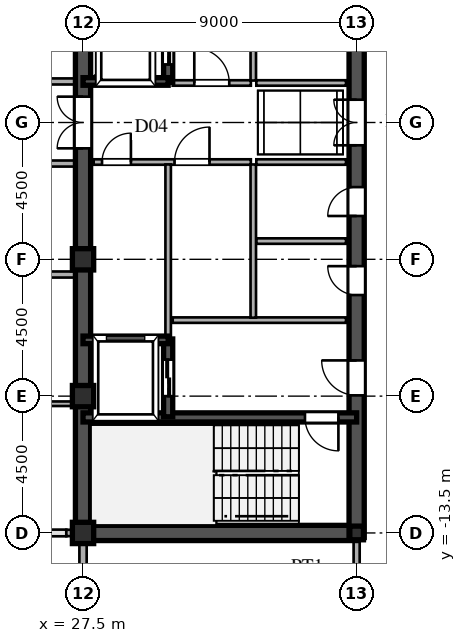
"""IFC4 building model, lengths in metres.
Left out: names, types, materials, properties, quantities, classifications, styles, units other than length and angle.
Written with IfcOpenShell. Run it as: python <this file> out.ifc"""

import sys

from ifc_helpers import new_model, si_unit, direction, frame, frame_2d, origin, origin_2d, place, context, subcontext, project, spatial, rectangle, hollow_rectangle, i_section, extrude, source, transform, mapped, element, fill, save


model = new_model("IFC4")
c1 = context("Model", 3, precision=1e-05, world=origin(), true_north=direction((0.0, 1.0)))
c2 = subcontext(c1, "Body", "Model", "MODEL_VIEW")
j1 = project(units=[si_unit("LENGTHUNIT", "METRE"), si_unit("PLANEANGLEUNIT", "RADIAN")], contexts=[c1])
p1 = place(None, origin())
s1 = spatial("IfcSite", under=j1, at=p1, CompositionType="ELEMENT")
p2 = place(p1, origin())
s2 = spatial("IfcBuilding", under=s1, at=p2, CompositionType="ELEMENT")
p3 = place(p2, frame((0.0, 0.0, 243.15)))
s3 = spatial("IfcBuildingStorey", under=s2, at=p3, CompositionType="ELEMENT", Elevation=243.15)
m1 = source(origin(), c2, "Body", "SweptSolid", [
    extrude(hollow_rectangle(XDim=0.7, YDim=0.7, WallThickness=0.03, at=origin_2d()), origin(), (0.0, 0.0, 1.0), 3.75),
])
for number, where, z_axis, x_axis in (
    (1, (27.5, -13.5, 0.0), (0.0, 0.0, 1.0), (1.0, 0.0, 0.0)),
    (2, (27.5, -9.0, 0.0), (0.0, 0.0, 1.0), (1.0, 0.0, 0.0)),
    (3, (27.5, -4.5, 0.0), (0.0, 0.0, 1.0), (1.0, 0.0, 0.0)),
):
    element("IfcColumn", number, at=place(p3, frame(where, z_axis=z_axis, x_axis=x_axis)), inside=s3, PredefinedType="COLUMN", context=c2, shape_type="MappedRepresentation", body=[
        mapped(m1, transform((0.0, 0.0, 0.0), scale=1.0)),
    ])
m2 = source(origin(), c2, "Body", "SweptSolid", [
    extrude(i_section(OverallWidth=0.45, OverallDepth=0.45, WebThickness=0.016, FlangeThickness=0.025, at=origin_2d()), origin(), (0.0, 0.0, 1.0), 3.75),
])
p4 = place(p3, frame((36.5, -13.5, 0.0), z_axis=(0.0, 0.0, 1.0), x_axis=(1.0, 0.0, 0.0)))
e4 = element("IfcColumn", 4, at=p4, inside=s3, PredefinedType="COLUMN", context=c2, shape_type="MappedRepresentation", body=[
    mapped(m2, transform((0.0, 0.0, 0.0), scale=1.0)),
])
p5 = place(p3, frame((27.5, -15.98, 0.0), z_axis=(0.0, 0.0, 1.0), x_axis=(0.0, 1.0, 0.0)))
e5 = element("IfcWall", 5, at=p5, inside=s3, PredefinedType="SOLIDWALL", context=c2, shape_type="SweptSolid", body=[
    extrude(rectangle(XDim=1.605, YDim=0.24, at=frame_2d((0.803, 0.0))), origin(), (0.0, 0.0, 1.0), 3.53),
])
p6 = place(p3, frame((27.5, -14.375, 0.0), z_axis=(0.0, 0.0, 1.0), x_axis=(0.0, 1.0, 0.0)))
e6 = element("IfcWall", 6, at=p6, inside=s3, PredefinedType="SOLIDWALL", context=c2, shape_type="SweptSolid", body=[
    extrude(rectangle(XDim=0.62, YDim=0.24, at=frame_2d((0.31, 0.0))), origin(), (0.0, 0.0, 1.0), 3.03),
])
p7 = place(p3, frame((26.95, -13.5, 0.0), z_axis=(0.0, 0.0, 1.0), x_axis=(1.0, 0.0, 0.0)))
e7 = element("IfcWall", 7, at=p7, inside=s3, PredefinedType="SOLIDWALL", context=c2, shape_type="SweptSolid", body=[
    extrude(rectangle(XDim=0.54, YDim=0.21, at=frame_2d((0.27, 0.0))), origin(), (0.0, 0.0, 1.0), 3.03),
])
for number, where, z_axis, x_axis in (
    (8, (27.5, -13.5, 0.0), (0.0, 0.0, 1.0), (0.0, 1.0, 0.0)),
    (9, (27.5, 1.3, 0.0), (0.0, 0.0, 1.0), (0.0, 1.0, 0.0)),
):
    element("IfcWall", number, at=place(p3, frame(where, z_axis=z_axis, x_axis=x_axis)), inside=s3, PredefinedType="SHEAR", context=c2, shape_type="SweptSolid", body=[
        extrude(rectangle(XDim=12.2, YDim=0.5, at=frame_2d((6.1, 0.0))), origin(), (0.0, 0.0, 1.0), 3.53),
    ])
p8 = place(p3, frame((27.5, -1.3, 0.0), z_axis=(0.0, 0.0, 1.0), x_axis=(0.0, 1.0, 0.0)))
e10 = element("IfcWall", 10, at=p8, inside=s3, PredefinedType="SHEAR", context=c2, shape_type="SweptSolid", body=[
    extrude(rectangle(XDim=2.6, YDim=0.5, at=frame_2d((1.3, 0.0))), origin(), (0.0, 0.0, 1.0), 3.53),
])
p9 = place(p8, frame((0.45, 0.0, 0.0)))
e11 = element("IfcOpeningElement", 11, at=p9, cuts=e10, PredefinedType="OPENING", context=c2, shape_type="SweptSolid", body=[
    extrude(rectangle(XDim=1.7, YDim=2.35, at=frame_2d((0.85, 1.175))), frame((0.0, 0.26, 0.0), z_axis=(0.0, -1.0, 0.0), x_axis=(1.0, 0.0, 0.0)), (0.0, 0.0, 1.0), 0.52),
])
p10 = place(p3, frame((27.5, -13.5, 0.0), z_axis=(0.0, 0.0, 1.0), x_axis=(1.0, 0.0, 0.0)))
e12 = element("IfcWall", 12, at=p10, inside=s3, PredefinedType="SHEAR", context=c2, shape_type="SweptSolid", body=[
    extrude(rectangle(XDim=9.0, YDim=0.5, at=frame_2d((4.5, 0.0))), origin(), (0.0, 0.0, 1.0), 3.53),
])
p11 = place(p3, frame((36.5, -13.65, 0.0), z_axis=(0.0, 0.0, 1.0), x_axis=(0.0, 1.0, 0.0)))
e13 = element("IfcWall", 13, at=p11, inside=s3, PredefinedType="SHEAR", context=c2, shape_type="SweptSolid", body=[
    extrude(rectangle(XDim=7.15, YDim=0.5, at=frame_2d((3.575, 0.0))), origin(), (0.0, 0.0, 1.0), 3.53),
])
p12 = place(p11, frame((4.675, 0.0, 0.0)))
e14 = element("IfcOpeningElement", 14, at=p12, cuts=e13, PredefinedType="OPENING", context=c2, shape_type="SweptSolid", body=[
    extrude(rectangle(XDim=1.15, YDim=2.2, at=frame_2d((0.575, 1.1))), frame((0.0, 0.26, 0.0), z_axis=(0.0, -1.0, 0.0), x_axis=(1.0, 0.0, 0.0)), (0.0, 0.0, 1.0), 0.52),
])
p13 = place(p3, frame((36.5, -1.3, 0.0), z_axis=(0.0, 0.0, 1.0), x_axis=(0.0, 1.0, 0.0)))
e15 = element("IfcWall", 15, at=p13, inside=s3, PredefinedType="SHEAR", context=c2, shape_type="SweptSolid", body=[
    extrude(rectangle(XDim=2.6, YDim=0.5, at=frame_2d((1.3, 0.0))), origin(), (0.0, 0.0, 1.0), 3.53),
])
p14 = place(p13, frame((0.55, 0.0, 0.0)))
e16 = element("IfcOpeningElement", 16, at=p14, cuts=e15, PredefinedType="OPENING", context=c2, shape_type="SweptSolid", body=[
    extrude(rectangle(XDim=1.5, YDim=2.3, at=frame_2d((0.75, 1.15))), frame((0.0, 0.26, 0.0), z_axis=(0.0, -1.0, 0.0), x_axis=(1.0, 0.0, 0.0)), (0.0, 0.0, 1.0), 0.52),
])
p15 = place(p3, frame((36.5, -6.5, 0.0), z_axis=(0.0, 0.0, 1.0), x_axis=(0.0, 1.0, 0.0)))
e17 = element("IfcWall", 17, at=p15, inside=s3, PredefinedType="SHEAR", context=c2, shape_type="SweptSolid", body=[
    extrude(rectangle(XDim=2.6, YDim=0.5, at=frame_2d((1.3, 0.0))), origin(), (0.0, 0.0, 1.0), 3.53),
])
p16 = place(p15, frame((0.825, 0.0, 0.0)))
e18 = element("IfcOpeningElement", 18, at=p16, cuts=e17, PredefinedType="OPENING", context=c2, shape_type="SweptSolid", body=[
    extrude(rectangle(XDim=0.95, YDim=2.15, at=frame_2d((0.475, 1.075))), frame((0.0, 0.26, 0.0), z_axis=(0.0, -1.0, 0.0), x_axis=(1.0, 0.0, 0.0)), (0.0, 0.0, 1.0), 0.52),
])
p17 = place(p3, frame((36.5, -3.9, 0.0), z_axis=(0.0, 0.0, 1.0), x_axis=(0.0, 1.0, 0.0)))
e19 = element("IfcWall", 19, at=p17, inside=s3, PredefinedType="SHEAR", context=c2, shape_type="SweptSolid", body=[
    extrude(rectangle(XDim=2.6, YDim=0.5, at=frame_2d((1.3, 0.0))), origin(), (0.0, 0.0, 1.0), 3.53),
])
p18 = place(p17, frame((0.825, 0.0, 0.0)))
e20 = element("IfcOpeningElement", 20, at=p18, cuts=e19, PredefinedType="OPENING", context=c2, shape_type="SweptSolid", body=[
    extrude(rectangle(XDim=0.95, YDim=2.15, at=frame_2d((0.475, 1.075))), frame((0.0, 0.26, 0.0), z_axis=(0.0, -1.0, 0.0), x_axis=(1.0, 0.0, 0.0)), (0.0, 0.0, 1.0), 0.52),
])
p19 = place(p3, frame((36.5, 1.3, 0.0), z_axis=(0.0, 0.0, 1.0), x_axis=(0.0, 1.0, 0.0)))
e21 = element("IfcWall", 21, at=p19, inside=s3, PredefinedType="SHEAR", context=c2, shape_type="SweptSolid", body=[
    extrude(rectangle(XDim=3.45, YDim=0.5, at=frame_2d((1.725, 0.0))), origin(), (0.0, 0.0, 1.0), 3.53),
])
p20 = place(p19, frame((1.25, 0.0, 0.0)))
e22 = element("IfcOpeningElement", 22, at=p20, cuts=e21, PredefinedType="OPENING", context=c2, shape_type="SweptSolid", body=[
    extrude(rectangle(XDim=0.95, YDim=2.15, at=frame_2d((0.475, 1.075))), frame((0.0, 0.26, 0.0), z_axis=(0.0, -1.0, 0.0), x_axis=(1.0, 0.0, 0.0)), (0.0, 0.0, 1.0), 0.52),
])
p21 = place(p3, frame((27.5, -9.7, 0.0), z_axis=(0.0, 0.0, 1.0), x_axis=(1.0, 0.0, 0.0)))
e23 = element("IfcWall", 23, at=p21, inside=s3, PredefinedType="SHEAR", context=c2, shape_type="SweptSolid", body=[
    extrude(rectangle(XDim=9.0, YDim=0.3, at=frame_2d((4.5, 0.0))), origin(), (0.0, 0.0, 1.0), 3.53),
])
p22 = place(p21, frame((7.3, 0.0, 0.0)))
e24 = element("IfcOpeningElement", 24, at=p22, cuts=e23, PredefinedType="OPENING", context=c2, shape_type="SweptSolid", body=[
    extrude(rectangle(XDim=1.1, YDim=2.2, at=frame_2d((0.55, 1.1))), frame((0.0, 0.16, 0.0), z_axis=(0.0, -1.0, 0.0), x_axis=(1.0, 0.0, 0.0)), (0.0, 0.0, 1.0), 0.32),
])
for number, where, z_axis, x_axis in (
    (25, (27.5, -7.15, 0.0), (0.0, 0.0, 1.0), (1.0, 0.0, 0.0)),
    (26, (27.5, 1.35, 0.0), (0.0, 0.0, 1.0), (1.0, 0.0, 0.0)),
):
    element("IfcWall", number, at=place(p3, frame(where, z_axis=z_axis, x_axis=x_axis)), inside=s3, PredefinedType="SHEAR", context=c2, shape_type="SweptSolid", body=[
        extrude(rectangle(XDim=2.8, YDim=0.25, at=frame_2d((1.4, 0.0))), origin(), (0.0, 0.0, 1.0), 3.53),
    ])
p23 = place(p3, frame((30.3, -9.68, 0.0), z_axis=(0.0, 0.0, 1.0), x_axis=(0.0, 1.0, 0.0)))
e27 = element("IfcWall", 27, at=p23, inside=s3, PredefinedType="SHEAR", context=c2, shape_type="SweptSolid", body=[
    extrude(rectangle(XDim=2.56, YDim=0.3, at=frame_2d((1.28, 0.0))), origin(), (0.0, 0.0, 1.0), 3.53),
])
p24 = place(p23, frame((0.68, 0.0, 0.0)))
e28 = element("IfcOpeningElement", 28, at=p24, cuts=e27, PredefinedType="OPENING", context=c2, shape_type="SweptSolid", body=[
    extrude(rectangle(XDim=1.2, YDim=2.25, at=frame_2d((0.6, 1.125))), frame((0.0, 0.16, 0.0), z_axis=(0.0, -1.0, 0.0), x_axis=(1.0, 0.0, 0.0)), (0.0, 0.0, 1.0), 0.32),
])
p25 = place(p3, frame((30.3, 1.32, 0.0), z_axis=(0.0, 0.0, 1.0), x_axis=(0.0, 1.0, 0.0)))
e29 = element("IfcWall", 29, at=p25, inside=s3, PredefinedType="SHEAR", context=c2, shape_type="SweptSolid", body=[
    extrude(rectangle(XDim=2.28, YDim=0.3, at=frame_2d((1.14, 0.0))), origin(), (0.0, 0.0, 1.0), 3.53),
])
p26 = place(p25, frame((0.59, 0.0, 0.0)))
e30 = element("IfcOpeningElement", 30, at=p26, cuts=e29, PredefinedType="OPENING", context=c2, shape_type="SweptSolid", body=[
    extrude(rectangle(XDim=1.1, YDim=2.2, at=frame_2d((0.55, 1.1))), frame((0.0, 0.16, 0.0), z_axis=(0.0, -1.0, 0.0), x_axis=(1.0, 0.0, 0.0)), (0.0, 0.0, 1.0), 0.32),
])
p27 = place(p3, frame((30.45, -6.5, 0.0), z_axis=(0.0, 0.0, 1.0), x_axis=(1.0, 0.0, 0.0)))
e31 = element("IfcWall", 31, at=p27, inside=s3, PredefinedType="PARTITIONING", context=c2, shape_type="SweptSolid", body=[
    extrude(rectangle(XDim=5.7, YDim=0.18, at=frame_2d((2.85, 0.0))), origin(), (0.0, 0.0, 1.0), 3.53),
])
p28 = place(p3, frame((33.1, -6.42, 0.0), z_axis=(0.0, 0.0, 1.0), x_axis=(0.0, 1.0, 0.0)))
e32 = element("IfcWall", 32, at=p28, inside=s3, PredefinedType="PARTITIONING", context=c2, shape_type="SweptSolid", body=[
    extrude(rectangle(XDim=5.04, YDim=0.18, at=frame_2d((2.52, 0.0))), origin(), (0.0, 0.0, 1.0), 3.53),
])
p29 = place(p3, frame((33.1, 1.38, 0.0), z_axis=(0.0, 0.0, 1.0), x_axis=(0.0, 1.0, 0.0)))
e33 = element("IfcWall", 33, at=p29, inside=s3, PredefinedType="PARTITIONING", context=c2, shape_type="SweptSolid", body=[
    extrude(rectangle(XDim=6.74, YDim=0.18, at=frame_2d((3.37, 0.0))), origin(), (0.0, 0.0, 1.0), 3.53),
])
p30 = place(p3, frame((27.85, -1.3, 0.0), z_axis=(0.0, 0.0, 1.0), x_axis=(1.0, 0.0, 0.0)))
e34 = element("IfcWall", 34, at=p30, inside=s3, PredefinedType="PARTITIONING", context=c2, shape_type="SweptSolid", body=[
    extrude(rectangle(XDim=2.45, YDim=0.18, at=frame_2d((1.225, 0.0))), origin(), (0.0, 0.0, 1.0), 3.53),
])
p31 = place(p30, frame((0.275, 0.0, 0.0)))
e35 = element("IfcOpeningElement", 35, at=p31, cuts=e34, PredefinedType="OPENING", context=c2, shape_type="SweptSolid", body=[
    extrude(rectangle(XDim=0.95, YDim=2.15, at=frame_2d((0.475, 1.075))), frame((0.0, 0.1, 0.0), z_axis=(0.0, -1.0, 0.0), x_axis=(1.0, 0.0, 0.0)), (0.0, 0.0, 1.0), 0.2),
])
p32 = place(p3, frame((30.3, -1.3, 0.0), z_axis=(0.0, 0.0, 1.0), x_axis=(1.0, 0.0, 0.0)))
e36 = element("IfcWall", 36, at=p32, inside=s3, PredefinedType="PARTITIONING", context=c2, shape_type="SweptSolid", body=[
    extrude(rectangle(XDim=2.72, YDim=0.18, at=frame_2d((1.36, 0.0))), origin(), (0.0, 0.0, 1.0), 3.53),
])
p33 = place(p32, frame((0.21, 0.0, 0.0)))
e37 = element("IfcOpeningElement", 37, at=p33, cuts=e36, PredefinedType="OPENING", context=c2, shape_type="SweptSolid", body=[
    extrude(rectangle(XDim=1.15, YDim=2.2, at=frame_2d((0.575, 1.1))), frame((0.0, 0.1, 0.0), z_axis=(0.0, -1.0, 0.0), x_axis=(1.0, 0.0, 0.0)), (0.0, 0.0, 1.0), 0.2),
])
p34 = place(p3, frame((30.3, -7.12, 0.0), z_axis=(0.0, 0.0, 1.0), x_axis=(0.0, 1.0, 0.0)))
e38 = element("IfcWall", 38, at=p34, inside=s3, PredefinedType="PARTITIONING", context=c2, shape_type="SweptSolid", body=[
    extrude(rectangle(XDim=5.74, YDim=0.18, at=frame_2d((2.87, 0.0))), origin(), (0.0, 0.0, 1.0), 3.53),
])
p35 = place(p3, frame((30.45, 1.3, 0.0), z_axis=(0.0, 0.0, 1.0), x_axis=(1.0, 0.0, 0.0)))
e39 = element("IfcWall", 39, at=p35, inside=s3, PredefinedType="PARTITIONING", context=c2, shape_type="SweptSolid", body=[
    extrude(rectangle(XDim=2.57, YDim=0.18, at=frame_2d((1.285, 0.0))), origin(), (0.0, 0.0, 1.0), 3.53),
])
p36 = place(p35, frame((0.71, 0.0, 0.0)))
e40 = element("IfcOpeningElement", 40, at=p36, cuts=e39, PredefinedType="OPENING", context=c2, shape_type="SweptSolid", body=[
    extrude(rectangle(XDim=1.15, YDim=2.2, at=frame_2d((0.575, 1.1))), frame((0.0, 0.1, 0.0), z_axis=(0.0, -1.0, 0.0), x_axis=(1.0, 0.0, 0.0)), (0.0, 0.0, 1.0), 0.2),
])
for number, where, z_axis, x_axis in (
    (41, (33.2, -1.3, 0.0), (0.0, 0.0, 1.0), (1.0, 0.0, 0.0)),
    (42, (33.2, 1.3, 0.0), (0.0, 0.0, 1.0), (1.0, 0.0, 0.0)),
    (43, (33.2, -3.9, 0.0), (0.0, 0.0, 1.0), (1.0, 0.0, 0.0)),
):
    element("IfcWall", number, at=place(p3, frame(where, z_axis=z_axis, x_axis=x_axis)), inside=s3, PredefinedType="PARTITIONING", context=c2, shape_type="SweptSolid", body=[
        extrude(rectangle(XDim=2.95, YDim=0.18, at=frame_2d((1.475, 0.0))), origin(), (0.0, 0.0, 1.0), 3.53),
    ])
p37 = place(p3, frame((5.585, -9.25, 0.0), z_axis=(0.0, 0.0, 1.0), x_axis=(1.0, 0.0, 0.0)))
e44 = element("IfcWall", 44, at=p37, inside=s3, PredefinedType="PARTITIONING", context=c2, shape_type="SweptSolid", body=[
    extrude(rectangle(XDim=21.66, YDim=0.15, at=frame_2d((10.83, 0.0))), origin(), (0.0, 0.0, 1.0), 3.53),
])
p38 = place(p37, frame((3.94, 0.0, 0.0)))
e45 = element("IfcOpeningElement", 45, at=p38, cuts=e44, PredefinedType="OPENING", context=c2, shape_type="SweptSolid", body=[
    extrude(rectangle(XDim=0.95, YDim=2.15, at=frame_2d((0.475, 1.075))), frame((0.0, 0.085, 0.0), z_axis=(0.0, -1.0, 0.0), x_axis=(1.0, 0.0, 0.0)), (0.0, 0.0, 1.0), 0.17),
])
p39 = place(p37, frame((11.69, 0.0, 0.0)))
e46 = element("IfcOpeningElement", 46, at=p39, cuts=e44, PredefinedType="OPENING", context=c2, shape_type="SweptSolid", body=[
    extrude(rectangle(XDim=0.95, YDim=2.15, at=frame_2d((0.475, 1.075))), frame((0.0, 0.085, 0.0), z_axis=(0.0, -1.0, 0.0), x_axis=(1.0, 0.0, 0.0)), (0.0, 0.0, 1.0), 0.17),
])
p40 = place(p37, frame((18.19, 0.0, 0.0)))
e47 = element("IfcOpeningElement", 47, at=p40, cuts=e44, PredefinedType="OPENING", context=c2, shape_type="SweptSolid", body=[
    extrude(rectangle(XDim=0.95, YDim=2.15, at=frame_2d((0.475, 1.075))), frame((0.0, 0.085, 0.0), z_axis=(0.0, -1.0, 0.0), x_axis=(1.0, 0.0, 0.0)), (0.0, 0.0, 1.0), 0.17),
])
p41 = place(p3, frame((-27.245, -5.0, 0.0), z_axis=(0.0, 0.0, 1.0), x_axis=(1.0, 0.0, 0.0)))
e48 = element("IfcWall", 48, at=p41, inside=s3, PredefinedType="PARTITIONING", context=c2, shape_type="SweptSolid", body=[
    extrude(rectangle(XDim=54.49, YDim=0.2, at=frame_2d((27.245, 0.0))), origin(), (0.0, 0.0, 1.0), 3.53),
])
p42 = place(p41, frame((23.47, 0.0, 0.0)))
e49 = element("IfcOpeningElement", 49, at=p42, cuts=e48, PredefinedType="OPENING", context=c2, shape_type="SweptSolid", body=[
    extrude(rectangle(XDim=1.05, YDim=2.25, at=frame_2d((0.525, 1.125))), frame((0.0, 0.11, 0.0), z_axis=(0.0, -1.0, 0.0), x_axis=(1.0, 0.0, 0.0)), (0.0, 0.0, 1.0), 0.22),
])
p43 = place(p3, frame((7.385, -1.35, 0.0), z_axis=(0.0, 0.0, 1.0), x_axis=(1.0, 0.0, 0.0)))
e50 = element("IfcWall", 50, at=p43, inside=s3, PredefinedType="PARTITIONING", context=c2, shape_type="SweptSolid", body=[
    extrude(rectangle(XDim=19.86, YDim=0.2, at=frame_2d((9.93, 0.0))), origin(), (0.0, 0.0, 1.0), 3.53),
])
p44 = place(p43, frame((5.84, 0.0, 0.0)))
e51 = element("IfcOpeningElement", 51, at=p44, cuts=e50, PredefinedType="OPENING", context=c2, shape_type="SweptSolid", body=[
    extrude(rectangle(XDim=1.05, YDim=2.25, at=frame_2d((0.525, 1.125))), frame((0.0, 0.11, 0.0), z_axis=(0.0, -1.0, 0.0), x_axis=(1.0, 0.0, 0.0)), (0.0, 0.0, 1.0), 0.22),
])
p45 = place(p3, frame((7.385, 1.35, 0.0), z_axis=(0.0, 0.0, 1.0), x_axis=(1.0, 0.0, 0.0)))
e52 = element("IfcWall", 52, at=p45, inside=s3, PredefinedType="PARTITIONING", context=c2, shape_type="SweptSolid", body=[
    extrude(rectangle(XDim=19.86, YDim=0.2, at=frame_2d((9.93, 0.0))), origin(), (0.0, 0.0, 1.0), 3.53),
])
p46 = place(p45, frame((5.84, 0.0, 0.0)))
e53 = element("IfcOpeningElement", 53, at=p46, cuts=e52, PredefinedType="OPENING", context=c2, shape_type="SweptSolid", body=[
    extrude(rectangle(XDim=1.05, YDim=2.25, at=frame_2d((0.525, 1.125))), frame((0.0, 0.11, 0.0), z_axis=(0.0, -1.0, 0.0), x_axis=(1.0, 0.0, 0.0)), (0.0, 0.0, 1.0), 0.22),
])
p47 = place(p3, frame((36.5, -15.515, 0.0), z_axis=(0.0, 0.0, 1.0), x_axis=(0.0, 1.0, 0.0)))
e54 = element("IfcWall", 54, at=p47, inside=s3, PredefinedType="PARTITIONING", context=c2, shape_type="SweptSolid", body=[
    extrude(rectangle(XDim=1.76, YDim=0.2, at=frame_2d((0.88, 0.0))), origin(), (0.0, 0.0, 1.0), 2.93),
])
m3 = source(origin(), c2, "Body", "SweptSolid", [
    extrude(rectangle(XDim=1.7, YDim=2.35, at=frame_2d((0.85, 1.175))), frame((0.0, 0.025, 0.0), z_axis=(0.0, -1.0, 0.0), x_axis=(1.0, 0.0, 0.0)), (0.0, 0.0, 1.0), 0.05),
])
p48 = place(p9, origin())
e55 = element("IfcDoor", 55, at=p48, inside=s3, OperationType="DOUBLE_SWING_LEFT", PredefinedType="DOOR", context=c2, shape_type="MappedRepresentation", body=[
    mapped(m3, transform((0.0, 0.0, 0.0), scale=1.0)),
])
fill(e11, e55)
m4 = source(origin(), c2, "Body", "SweptSolid", [
    extrude(rectangle(XDim=1.15, YDim=2.2, at=frame_2d((0.575, 1.1))), frame((0.0, 0.025, 0.0), z_axis=(0.0, -1.0, 0.0), x_axis=(1.0, 0.0, 0.0)), (0.0, 0.0, 1.0), 0.05),
])
p49 = place(p12, origin())
e56 = element("IfcDoor", 56, at=p49, inside=s3, OperationType="SINGLE_SWING_RIGHT", PredefinedType="DOOR", context=c2, shape_type="MappedRepresentation", body=[
    mapped(m4, transform((0.0, 0.0, 0.0), scale=1.0)),
])
fill(e14, e56)
m5 = source(origin(), c2, "Body", "SweptSolid", [
    extrude(rectangle(XDim=1.5, YDim=2.3, at=frame_2d((0.75, 1.15))), frame((0.0, 0.025, 0.0), z_axis=(0.0, -1.0, 0.0), x_axis=(1.0, 0.0, 0.0)), (0.0, 0.0, 1.0), 0.05),
])
p50 = place(p14, origin())
e57 = element("IfcDoor", 57, at=p50, inside=s3, OperationType="DOUBLE_SWING_LEFT", PredefinedType="DOOR", context=c2, shape_type="MappedRepresentation", body=[
    mapped(m5, transform((0.0, 0.0, 0.0), scale=1.0)),
])
fill(e16, e57)
m6 = source(origin(), c2, "Body", "SweptSolid", [
    extrude(rectangle(XDim=0.95, YDim=2.15, at=frame_2d((0.475, 1.075))), frame((0.0, 0.025, 0.0), z_axis=(0.0, -1.0, 0.0), x_axis=(1.0, 0.0, 0.0)), (0.0, 0.0, 1.0), 0.05),
])
p51 = place(p16, origin())
e58 = element("IfcDoor", 58, at=p51, inside=s3, OperationType="SINGLE_SWING_RIGHT", PredefinedType="DOOR", context=c2, shape_type="MappedRepresentation", body=[
    mapped(m6, transform((0.0, 0.0, 0.0), scale=1.0)),
])
fill(e18, e58)
p52 = place(p18, origin())
e59 = element("IfcDoor", 59, at=p52, inside=s3, OperationType="SINGLE_SWING_LEFT", PredefinedType="DOOR", context=c2, shape_type="MappedRepresentation", body=[
    mapped(m6, transform((0.0, 0.0, 0.0), scale=1.0)),
])
fill(e20, e59)
m7 = source(origin(), c2, "Body", "SweptSolid", [
    extrude(rectangle(XDim=1.1, YDim=2.2, at=frame_2d((0.55, 1.1))), frame((0.0, 0.025, 0.0), z_axis=(0.0, -1.0, 0.0), x_axis=(1.0, 0.0, 0.0)), (0.0, 0.0, 1.0), 0.05),
])
p53 = place(p22, frame((1.1, 0.0, 0.0), z_axis=(0.0, 0.0, 1.0), x_axis=(-1.0, 0.0, 0.0)))
e60 = element("IfcDoor", 60, at=p53, inside=s3, OperationType="SINGLE_SWING_RIGHT", PredefinedType="DOOR", context=c2, shape_type="MappedRepresentation", body=[
    mapped(m7, transform((0.0, 0.0, 0.0), scale=1.0)),
])
fill(e24, e60)
m8 = source(origin(), c2, "Body", "SweptSolid", [
    extrude(rectangle(XDim=1.2, YDim=2.25, at=frame_2d((0.6, 1.125))), frame((0.0, 0.025, 0.0), z_axis=(0.0, -1.0, 0.0), x_axis=(1.0, 0.0, 0.0)), (0.0, 0.0, 1.0), 0.05),
])
p54 = place(p24, origin())
e61 = element("IfcDoor", 61, at=p54, inside=s3, OperationType="DOUBLE_DOOR_SLIDING", PredefinedType="DOOR", context=c2, shape_type="MappedRepresentation", body=[
    mapped(m8, transform((0.0, 0.0, 0.0), scale=1.0)),
])
fill(e28, e61)
m9 = source(origin(), c2, "Body", "SweptSolid", [
    extrude(rectangle(XDim=1.1, YDim=2.2, at=frame_2d((0.55, 1.1))), frame((0.0, 0.025, 0.0), z_axis=(0.0, -1.0, 0.0), x_axis=(1.0, 0.0, 0.0)), (0.0, 0.0, 1.0), 0.05),
])
p55 = place(p26, origin())
e62 = element("IfcDoor", 62, at=p55, inside=s3, OperationType="DOUBLE_DOOR_SLIDING", PredefinedType="DOOR", context=c2, shape_type="MappedRepresentation", body=[
    mapped(m9, transform((0.0, 0.0, 0.0), scale=1.0)),
])
fill(e30, e62)
p56 = place(p31, origin())
e63 = element("IfcDoor", 63, at=p56, inside=s3, OperationType="SINGLE_SWING_RIGHT", PredefinedType="DOOR", context=c2, shape_type="MappedRepresentation", body=[
    mapped(m6, transform((0.0, 0.0, 0.0), scale=1.0)),
])
fill(e35, e63)
p57 = place(p33, origin())
e64 = element("IfcDoor", 64, at=p57, inside=s3, OperationType="SINGLE_SWING_RIGHT", PredefinedType="DOOR", context=c2, shape_type="MappedRepresentation", body=[
    mapped(m4, transform((0.0, 0.0, 0.0), scale=1.0)),
])
fill(e37, e64)
p58 = place(p36, origin())
e65 = element("IfcDoor", 65, at=p58, inside=s3, OperationType="SINGLE_SWING_LEFT", PredefinedType="DOOR", context=c2, shape_type="MappedRepresentation", body=[
    mapped(m4, transform((0.0, 0.0, 0.0), scale=1.0)),
])
fill(e40, e65)
save(model, sys.argv[1])
